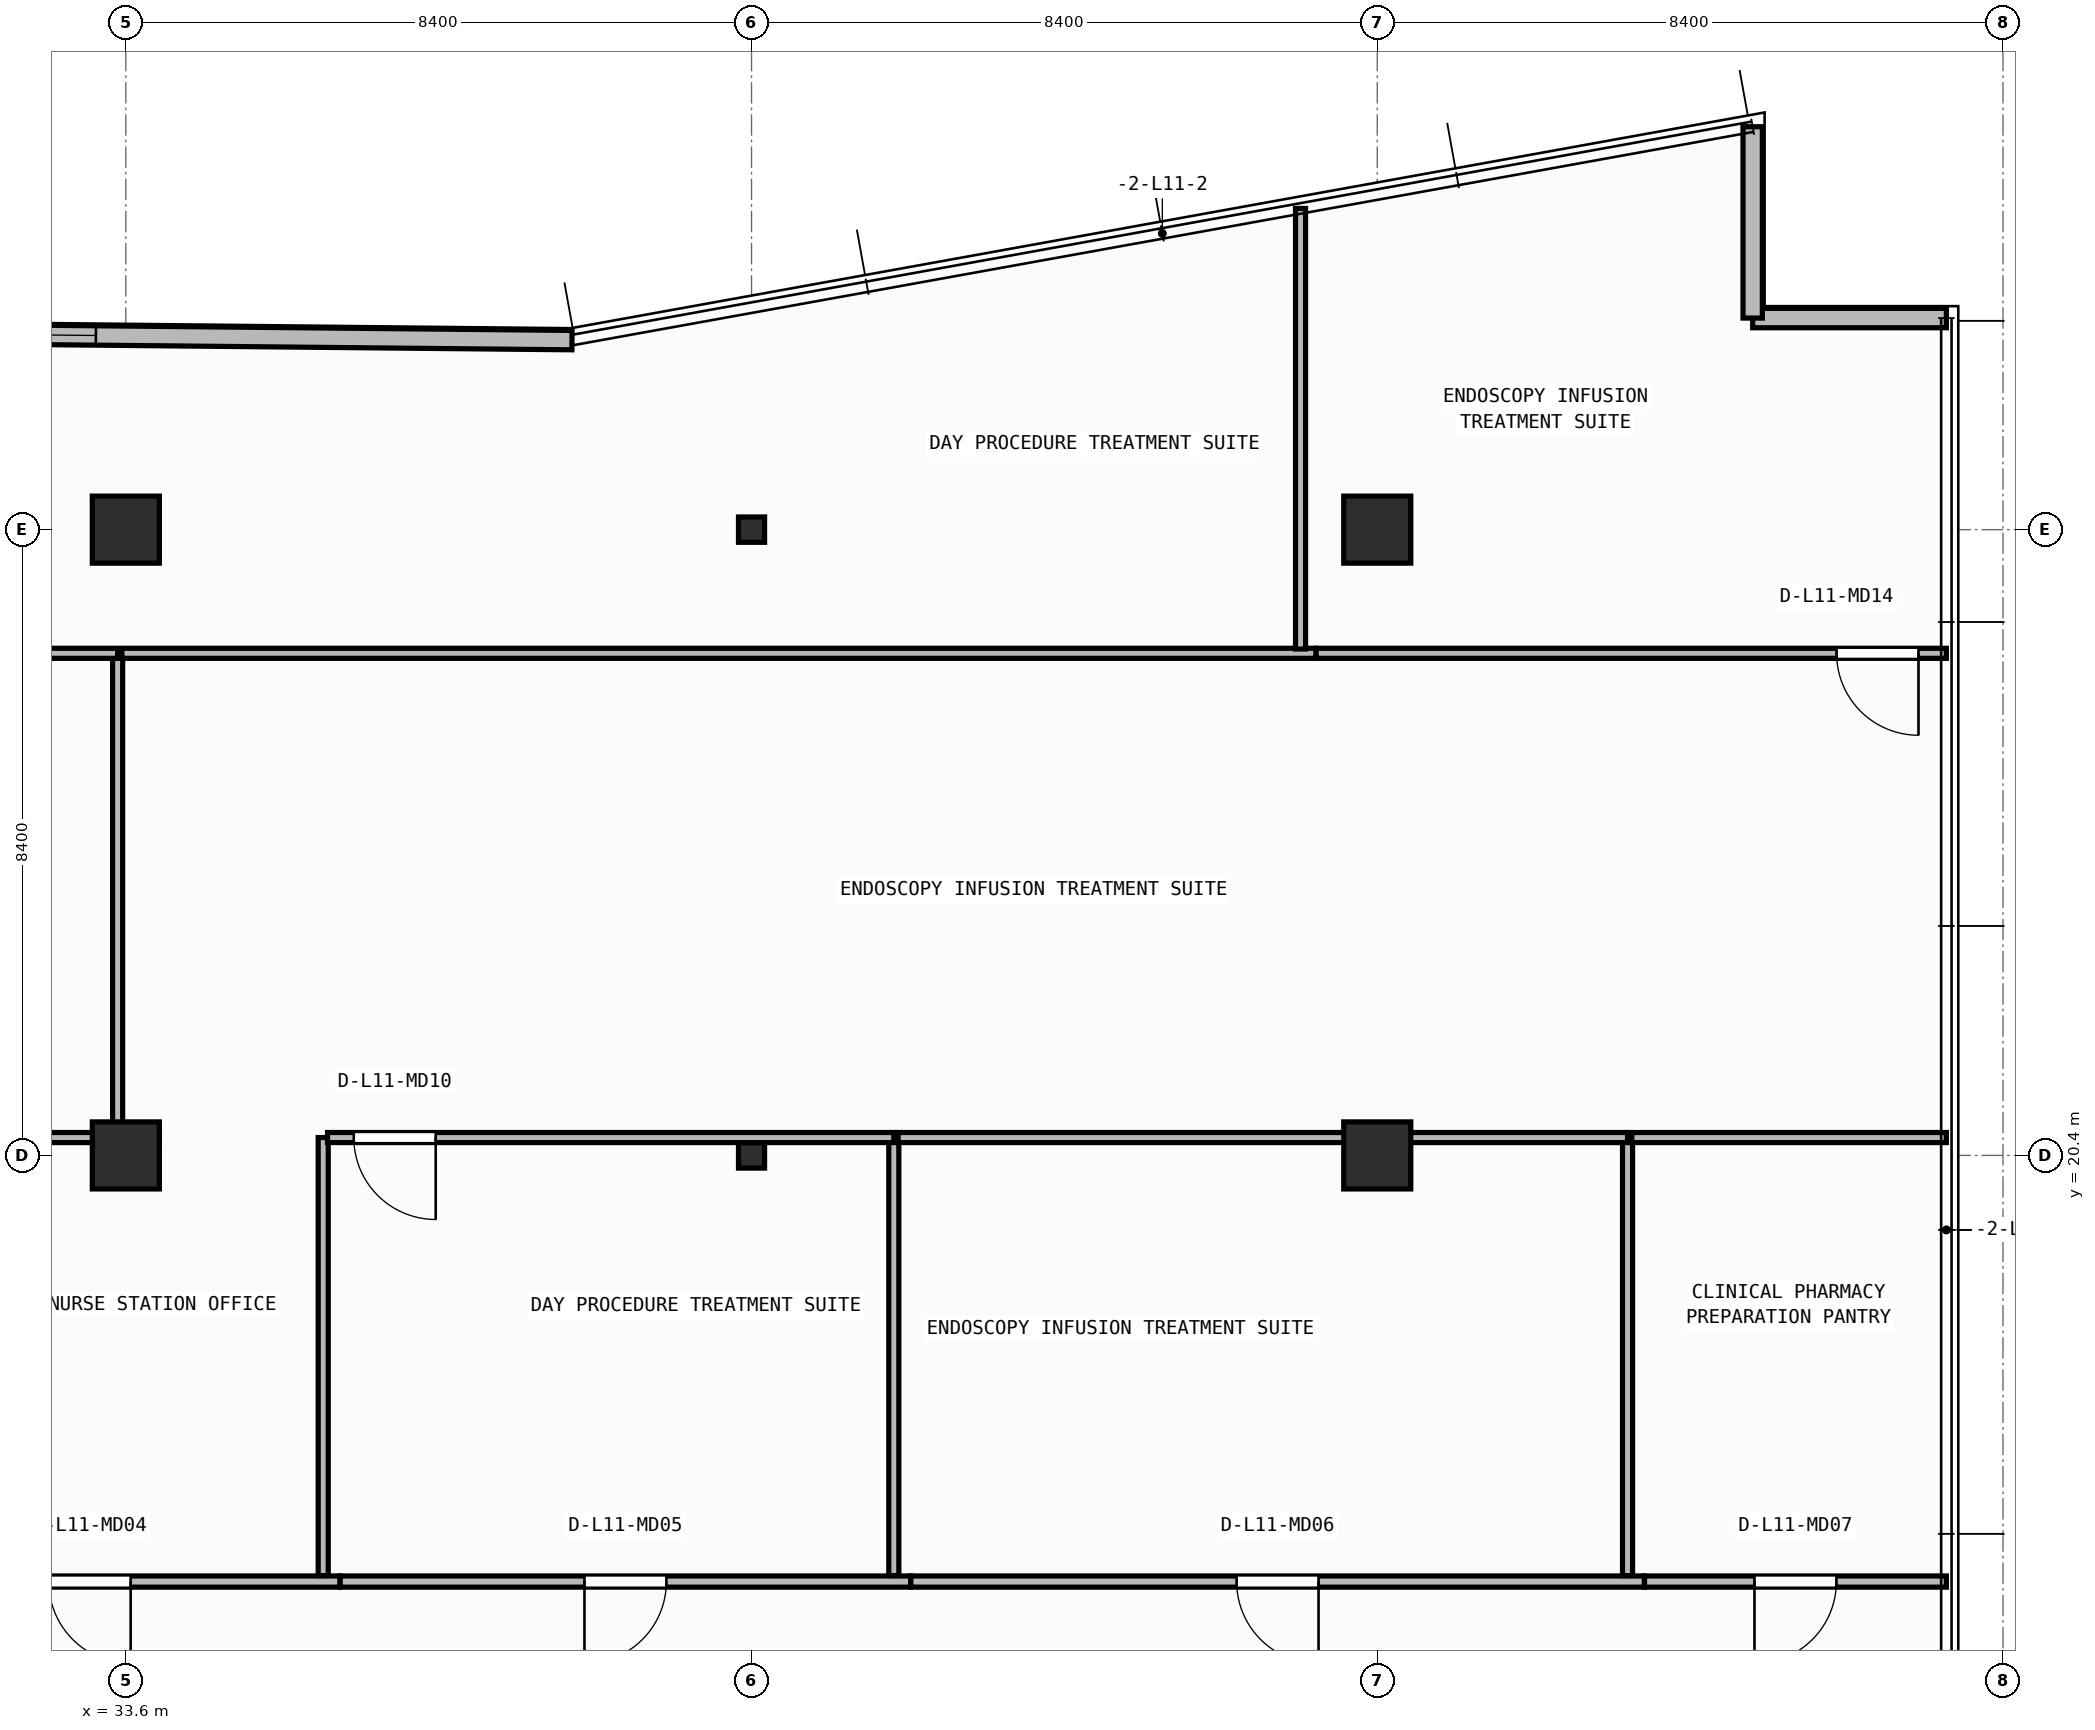
"""IFC4 building model, lengths in metres.
Left out: names, types, materials, properties, quantities, classifications, styles, units other than length and angle.
Written with IfcOpenShell. Run it as: python <this file> out.ifc"""

import sys

from ifc_helpers import new_model, si_unit, direction, frame, frame_2d, origin, origin_2d, place, context, subcontext, project, spatial, rectangle, i_section, extrude, element, fill, save


model = new_model("IFC4")
c1 = context("Model", 3, precision=1e-05, world=origin(), true_north=direction((0.0, 1.0)))
c2 = subcontext(c1, "Body", "Model", "MODEL_VIEW")
j1 = project(units=[si_unit("LENGTHUNIT", "METRE"), si_unit("PLANEANGLEUNIT", "RADIAN")], contexts=[c1])
p1 = place(None, origin())
s1 = spatial("IfcSite", under=j1, at=p1, CompositionType="ELEMENT")
p2 = place(p1, origin())
s2 = spatial("IfcBuilding", under=s1, at=p2, CompositionType="ELEMENT")
p3 = place(p2, frame((0.0, 0.0, 46.2)))
s3 = spatial("IfcBuildingStorey", under=s2, at=p3, CompositionType="ELEMENT", Elevation=46.2)
p4 = place(p3, frame((33.6, 20.4, 0.0), z_axis=(0.0, 0.0, 1.0), x_axis=(1.0, 0.0, 0.0)))
e1 = element("IfcColumn", 1, at=p4, inside=s3, PredefinedType="COLUMN", context=c2, shape_type="SweptSolid", body=[
    extrude(rectangle(XDim=0.9, YDim=0.9, at=origin_2d()), origin(), (0.0, 0.0, 1.0), 3.95),
])
p5 = place(p3, frame((42.0, 20.4, 0.0), z_axis=(0.0, 0.0, 1.0), x_axis=(1.0, 0.0, 0.0)))
e2 = element("IfcColumn", 2, at=p5, inside=s3, PredefinedType="COLUMN", context=c2, shape_type="SweptSolid", body=[
    extrude(i_section(OverallWidth=0.35, OverallDepth=0.34, WebThickness=0.016, FlangeThickness=0.028, at=origin_2d()), origin(), (0.0, 0.0, 1.0), 3.95),
])
for number, where, z_axis, x_axis in (
    (3, (50.4, 20.4, 0.0), (0.0, 0.0, 1.0), (1.0, 0.0, 0.0)),
    (4, (33.6, 28.8, 0.0), (0.0, 0.0, 1.0), (1.0, 0.0, 0.0)),
):
    element("IfcColumn", number, at=place(p3, frame(where, z_axis=z_axis, x_axis=x_axis)), inside=s3, PredefinedType="COLUMN", context=c2, shape_type="SweptSolid", body=[
        extrude(rectangle(XDim=0.9, YDim=0.9, at=origin_2d()), origin(), (0.0, 0.0, 1.0), 3.95),
    ])
p6 = place(p3, frame((42.0, 28.8, 0.0), z_axis=(0.0, 0.0, 1.0), x_axis=(1.0, 0.0, 0.0)))
e5 = element("IfcColumn", 5, at=p6, inside=s3, PredefinedType="COLUMN", context=c2, shape_type="SweptSolid", body=[
    extrude(i_section(OverallWidth=0.35, OverallDepth=0.34, WebThickness=0.016, FlangeThickness=0.028, at=origin_2d()), origin(), (0.0, 0.0, 1.0), 3.95),
])
p7 = place(p3, frame((50.4, 28.8, 0.0), z_axis=(0.0, 0.0, 1.0), x_axis=(1.0, 0.0, 0.0)))
e6 = element("IfcColumn", 6, at=p7, inside=s3, PredefinedType="COLUMN", context=c2, shape_type="SweptSolid", body=[
    extrude(rectangle(XDim=0.9, YDim=0.9, at=origin_2d()), origin(), (0.0, 0.0, 1.0), 3.95),
])
p8 = place(p3, frame((58.04, 31.64, 0.0), z_axis=(0.0, 0.0, 1.0), x_axis=(-1.0, 0.0, 0.0)))
e7 = element("IfcWall", 7, at=p8, inside=s3, PredefinedType="STANDARD", context=c2, shape_type="SweptSolid", body=[
    extrude(rectangle(XDim=2.6, YDim=0.26, at=frame_2d((1.3, 0.0))), origin(), (0.0, 0.0, 1.0), 3.71),
])
p9 = place(p3, frame((55.44, 31.64, 0.0), z_axis=(0.0, 0.0, 1.0), x_axis=(0.0, 1.0, 0.0)))
e8 = element("IfcWall", 8, at=p9, inside=s3, PredefinedType="STANDARD", context=c2, shape_type="SweptSolid", body=[
    extrude(rectangle(XDim=2.569, YDim=0.26, at=frame_2d((1.284, 0.0))), origin(), (0.0, 0.0, 1.0), 3.71),
])
p10 = place(p3, frame((39.59, 31.344, 0.0), z_axis=(0.0, 0.0, 1.0), x_axis=(-0.999952362926, 0.009760731435, 0.0)))
e9 = element("IfcWall", 9, at=p10, inside=s3, PredefinedType="STANDARD", context=c2, shape_type="SweptSolid", body=[
    extrude(rectangle(XDim=15.183, YDim=0.26, at=frame_2d((7.591, 0.0))), origin(), (0.0, 0.0, 1.0), 3.71),
])
p11 = place(p10, frame((6.391, 0.0, 0.9)))
e10 = element("IfcOpeningElement", 10, at=p11, cuts=e9, PredefinedType="OPENING", context=c2, shape_type="SweptSolid", body=[
    extrude(rectangle(XDim=2.4, YDim=1.65, at=frame_2d((1.2, 0.825))), frame((0.0, 0.14, 0.0), z_axis=(0.0, -1.0, 0.0), x_axis=(1.0, 0.0, 0.0)), (0.0, 0.0, 1.0), 0.28),
])
p12 = place(p3, frame((36.476, 14.68, 0.0), z_axis=(0.0, 0.0, 1.0), x_axis=(-1.0, 0.0, 0.0)))
e11 = element("IfcWall", 11, at=p12, inside=s3, PredefinedType="PARTITIONING", context=c2, shape_type="SweptSolid", body=[
    extrude(rectangle(XDim=6.722, YDim=0.15, at=frame_2d((3.361, 0.0))), origin(), (0.0, 0.0, 1.0), 3.71),
])
p13 = place(p12, frame((2.811, 0.0, 0.0)))
e12 = element("IfcOpeningElement", 12, at=p13, cuts=e11, PredefinedType="OPENING", context=c2, shape_type="SweptSolid", body=[
    extrude(rectangle(XDim=1.1, YDim=2.1, at=frame_2d((0.55, 1.05))), frame((0.0, 0.085, 0.0), z_axis=(0.0, -1.0, 0.0), x_axis=(1.0, 0.0, 0.0)), (0.0, 0.0, 1.0), 0.17),
])
p14 = place(p3, frame((44.136, 14.68, 0.0), z_axis=(0.0, 0.0, 1.0), x_axis=(-1.0, 0.0, 0.0)))
e13 = element("IfcWall", 13, at=p14, inside=s3, PredefinedType="PARTITIONING", context=c2, shape_type="SweptSolid", body=[
    extrude(rectangle(XDim=7.658, YDim=0.15, at=frame_2d((3.829, 0.0))), origin(), (0.0, 0.0, 1.0), 3.71),
])
p15 = place(p14, frame((3.279, 0.0, 0.0)))
e14 = element("IfcOpeningElement", 14, at=p15, cuts=e13, PredefinedType="OPENING", context=c2, shape_type="SweptSolid", body=[
    extrude(rectangle(XDim=1.1, YDim=2.1, at=frame_2d((0.55, 1.05))), frame((0.0, 0.085, 0.0), z_axis=(0.0, -1.0, 0.0), x_axis=(1.0, 0.0, 0.0)), (0.0, 0.0, 1.0), 0.17),
])
p16 = place(p3, frame((53.986, 14.68, 0.0), z_axis=(0.0, 0.0, 1.0), x_axis=(-1.0, 0.0, 0.0)))
e15 = element("IfcWall", 15, at=p16, inside=s3, PredefinedType="PARTITIONING", context=c2, shape_type="SweptSolid", body=[
    extrude(rectangle(XDim=9.848, YDim=0.15, at=frame_2d((4.924, 0.0))), origin(), (0.0, 0.0, 1.0), 3.71),
])
p17 = place(p16, frame((4.374, 0.0, 0.0)))
e16 = element("IfcOpeningElement", 16, at=p17, cuts=e15, PredefinedType="OPENING", context=c2, shape_type="SweptSolid", body=[
    extrude(rectangle(XDim=1.1, YDim=2.1, at=frame_2d((0.55, 1.05))), frame((0.0, 0.085, 0.0), z_axis=(0.0, -1.0, 0.0), x_axis=(1.0, 0.0, 0.0)), (0.0, 0.0, 1.0), 0.17),
])
p18 = place(p3, frame((58.04, 14.68, 0.0), z_axis=(0.0, 0.0, 1.0), x_axis=(-1.0, 0.0, 0.0)))
e17 = element("IfcWall", 17, at=p18, inside=s3, PredefinedType="PARTITIONING", context=c2, shape_type="SweptSolid", body=[
    extrude(rectangle(XDim=4.052, YDim=0.15, at=frame_2d((2.026, 0.0))), origin(), (0.0, 0.0, 1.0), 3.71),
])
p19 = place(p18, frame((1.476, 0.0, 0.0)))
e18 = element("IfcOpeningElement", 18, at=p19, cuts=e17, PredefinedType="OPENING", context=c2, shape_type="SweptSolid", body=[
    extrude(rectangle(XDim=1.1, YDim=2.1, at=frame_2d((0.55, 1.05))), frame((0.0, 0.085, 0.0), z_axis=(0.0, -1.0, 0.0), x_axis=(1.0, 0.0, 0.0)), (0.0, 0.0, 1.0), 0.17),
])
p20 = place(p3, frame((36.25, 14.76, 0.0), z_axis=(0.0, 0.0, 1.0), x_axis=(0.0, 1.0, 0.0)))
e19 = element("IfcWall", 19, at=p20, inside=s3, PredefinedType="PARTITIONING", context=c2, shape_type="SweptSolid", body=[
    extrude(rectangle(XDim=5.88, YDim=0.135, at=frame_2d((2.94, 0.0))), origin(), (0.0, 0.0, 1.0), 3.71),
])
p21 = place(p3, frame((34.05, 20.64, 0.0), z_axis=(0.0, 0.0, 1.0), x_axis=(-1.0, 0.0, 0.0)))
e20 = element("IfcWall", 20, at=p21, inside=s3, PredefinedType="PARTITIONING", context=c2, shape_type="SweptSolid", body=[
    extrude(rectangle(XDim=4.085, YDim=0.135, at=frame_2d((2.042, 0.0))), origin(), (0.0, 0.0, 1.0), 3.073),
])
p22 = place(p3, frame((43.91, 14.76, 0.0), z_axis=(0.0, 0.0, 1.0), x_axis=(0.0, 1.0, 0.0)))
e21 = element("IfcWall", 21, at=p22, inside=s3, PredefinedType="PARTITIONING", context=c2, shape_type="SweptSolid", body=[
    extrude(rectangle(XDim=5.88, YDim=0.135, at=frame_2d((2.94, 0.0))), origin(), (0.0, 0.0, 1.0), 3.71),
])
p23 = place(p3, frame((43.91, 20.64, 0.0), z_axis=(0.0, 0.0, 1.0), x_axis=(-1.0, 0.0, 0.0)))
e22 = element("IfcWall", 22, at=p23, inside=s3, PredefinedType="PARTITIONING", context=c2, shape_type="SweptSolid", body=[
    extrude(rectangle(XDim=7.602, YDim=0.135, at=frame_2d((3.801, 0.0))), origin(), (0.0, 0.0, 1.0), 3.073),
])
p24 = place(p23, frame((6.15, 0.0, 0.0)))
e23 = element("IfcOpeningElement", 23, at=p24, cuts=e22, PredefinedType="OPENING", context=c2, shape_type="SweptSolid", body=[
    extrude(rectangle(XDim=1.1, YDim=2.1, at=frame_2d((0.55, 1.05))), frame((0.0, 0.077, 0.0), z_axis=(0.0, -1.0, 0.0), x_axis=(1.0, 0.0, 0.0)), (0.0, 0.0, 1.0), 0.155),
])
p25 = place(p3, frame((53.76, 14.76, 0.0), z_axis=(0.0, 0.0, 1.0), x_axis=(0.0, 1.0, 0.0)))
e24 = element("IfcWall", 24, at=p25, inside=s3, PredefinedType="PARTITIONING", context=c2, shape_type="SweptSolid", body=[
    extrude(rectangle(XDim=5.88, YDim=0.135, at=frame_2d((2.94, 0.0))), origin(), (0.0, 0.0, 1.0), 3.71),
])
p26 = place(p3, frame((53.76, 20.64, 0.0), z_axis=(0.0, 0.0, 1.0), x_axis=(-1.0, 0.0, 0.0)))
e25 = element("IfcWall", 25, at=p26, inside=s3, PredefinedType="PARTITIONING", context=c2, shape_type="SweptSolid", body=[
    extrude(rectangle(XDim=9.792, YDim=0.135, at=frame_2d((4.896, 0.0))), origin(), (0.0, 0.0, 1.0), 3.073),
])
p27 = place(p3, frame((58.04, 20.64, 0.0), z_axis=(0.0, 0.0, 1.0), x_axis=(-1.0, 0.0, 0.0)))
e26 = element("IfcWall", 26, at=p27, inside=s3, PredefinedType="PARTITIONING", context=c2, shape_type="SweptSolid", body=[
    extrude(rectangle(XDim=4.223, YDim=0.135, at=frame_2d((2.111, 0.0))), origin(), (0.0, 0.0, 1.0), 3.71),
])
p28 = place(p3, frame((33.49, 20.698, 0.0), z_axis=(0.0, 0.0, 1.0), x_axis=(0.0, 1.0, 0.0)))
e27 = element("IfcWall", 27, at=p28, inside=s3, PredefinedType="PARTITIONING", context=c2, shape_type="SweptSolid", body=[
    extrude(rectangle(XDim=6.442, YDim=0.135, at=frame_2d((3.221, 0.0))), origin(), (0.0, 0.0, 1.0), 3.073),
])
p29 = place(p3, frame((33.49, 27.14, 0.0), z_axis=(0.0, 0.0, 1.0), x_axis=(-1.0, 0.0, 0.0)))
e28 = element("IfcWall", 28, at=p29, inside=s3, PredefinedType="PARTITIONING", context=c2, shape_type="SweptSolid", body=[
    extrude(rectangle(XDim=4.24, YDim=0.135, at=frame_2d((2.12, 0.0))), origin(), (0.0, 0.0, 1.0), 3.71),
])
p30 = place(p29, frame((2.872, 0.0, 0.0)))
e29 = element("IfcOpeningElement", 29, at=p30, cuts=e28, PredefinedType="OPENING", context=c2, shape_type="SweptSolid", body=[
    extrude(rectangle(XDim=1.1, YDim=2.1, at=frame_2d((0.55, 1.05))), frame((0.0, 0.077, 0.0), z_axis=(0.0, -1.0, 0.0), x_axis=(1.0, 0.0, 0.0)), (0.0, 0.0, 1.0), 0.155),
])
p31 = place(p3, frame((49.577, 27.14, 0.0), z_axis=(0.0, 0.0, 1.0), x_axis=(-1.0, 0.0, 0.0)))
e30 = element("IfcWall", 30, at=p31, inside=s3, PredefinedType="PARTITIONING", context=c2, shape_type="SweptSolid", body=[
    extrude(rectangle(XDim=16.03, YDim=0.135, at=frame_2d((8.015, 0.0))), origin(), (0.0, 0.0, 1.0), 3.71),
])
p32 = place(p3, frame((58.04, 27.14, 0.0), z_axis=(0.0, 0.0, 1.0), x_axis=(-1.0, 0.0, 0.0)))
e31 = element("IfcWall", 31, at=p32, inside=s3, PredefinedType="PARTITIONING", context=c2, shape_type="SweptSolid", body=[
    extrude(rectangle(XDim=8.46, YDim=0.135, at=frame_2d((4.23, 0.0))), origin(), (0.0, 0.0, 1.0), 3.71),
])
p33 = place(p32, frame((0.374, 0.0, 0.0)))
e32 = element("IfcOpeningElement", 32, at=p33, cuts=e31, PredefinedType="OPENING", context=c2, shape_type="SweptSolid", body=[
    extrude(rectangle(XDim=1.1, YDim=2.1, at=frame_2d((0.55, 1.05))), frame((0.0, 0.077, 0.0), z_axis=(0.0, -1.0, 0.0), x_axis=(1.0, 0.0, 0.0)), (0.0, 0.0, 1.0), 0.155),
])
p34 = place(p3, frame((49.37, 27.198, 0.0), z_axis=(0.0, 0.0, 1.0), x_axis=(0.0, 1.0, 0.0)))
e33 = element("IfcWall", 33, at=p34, inside=s3, PredefinedType="PARTITIONING", context=c2, shape_type="SweptSolid", body=[
    extrude(rectangle(XDim=5.914, YDim=0.135, at=frame_2d((2.957, 0.0))), origin(), (0.0, 0.0, 1.0), 3.71),
])
p35 = place(p11, origin())
e34 = element("IfcWindow", 34, at=p35, inside=s3, PartitioningType="SINGLE_PANEL", PredefinedType="WINDOW", context=c2, shape_type="SweptSolid", body=[
    extrude(rectangle(XDim=2.4, YDim=1.65, at=frame_2d((1.2, 0.825))), frame((0.0, 0.03, 0.0), z_axis=(0.0, -1.0, 0.0), x_axis=(1.0, 0.0, 0.0)), (0.0, 0.0, 1.0), 0.06),
])
fill(e10, e34)
p36 = place(p13, origin())
e35 = element("IfcDoor", 35, at=p36, inside=s3, OperationType="SINGLE_SWING_LEFT", PredefinedType="DOOR", context=c2, shape_type="SweptSolid", body=[
    extrude(rectangle(XDim=1.1, YDim=2.1, at=frame_2d((0.55, 1.05))), frame((0.0, 0.025, 0.0), z_axis=(0.0, -1.0, 0.0), x_axis=(1.0, 0.0, 0.0)), (0.0, 0.0, 1.0), 0.05),
])
fill(e12, e35)
p37 = place(p15, origin())
e36 = element("IfcDoor", 36, at=p37, inside=s3, OperationType="SINGLE_SWING_RIGHT", PredefinedType="DOOR", context=c2, shape_type="SweptSolid", body=[
    extrude(rectangle(XDim=1.1, YDim=2.1, at=frame_2d((0.55, 1.05))), frame((0.0, 0.025, 0.0), z_axis=(0.0, -1.0, 0.0), x_axis=(1.0, 0.0, 0.0)), (0.0, 0.0, 1.0), 0.05),
])
fill(e14, e36)
p38 = place(p17, origin())
e37 = element("IfcDoor", 37, at=p38, inside=s3, OperationType="SINGLE_SWING_LEFT", PredefinedType="DOOR", context=c2, shape_type="SweptSolid", body=[
    extrude(rectangle(XDim=1.1, YDim=2.1, at=frame_2d((0.55, 1.05))), frame((0.0, 0.025, 0.0), z_axis=(0.0, -1.0, 0.0), x_axis=(1.0, 0.0, 0.0)), (0.0, 0.0, 1.0), 0.05),
])
fill(e16, e37)
p39 = place(p19, origin())
e38 = element("IfcDoor", 38, at=p39, inside=s3, OperationType="SINGLE_SWING_RIGHT", PredefinedType="DOOR", context=c2, shape_type="SweptSolid", body=[
    extrude(rectangle(XDim=1.1, YDim=2.1, at=frame_2d((0.55, 1.05))), frame((0.0, 0.025, 0.0), z_axis=(0.0, -1.0, 0.0), x_axis=(1.0, 0.0, 0.0)), (0.0, 0.0, 1.0), 0.05),
])
fill(e18, e38)
p40 = place(p24, origin())
e39 = element("IfcDoor", 39, at=p40, inside=s3, OperationType="SINGLE_SWING_LEFT", PredefinedType="DOOR", context=c2, shape_type="SweptSolid", body=[
    extrude(rectangle(XDim=1.1, YDim=2.1, at=frame_2d((0.55, 1.05))), frame((0.0, 0.025, 0.0), z_axis=(0.0, -1.0, 0.0), x_axis=(1.0, 0.0, 0.0)), (0.0, 0.0, 1.0), 0.05),
])
fill(e23, e39)
p41 = place(p33, origin())
e40 = element("IfcDoor", 40, at=p41, inside=s3, OperationType="SINGLE_SWING_LEFT", PredefinedType="DOOR", context=c2, shape_type="SweptSolid", body=[
    extrude(rectangle(XDim=1.1, YDim=2.1, at=frame_2d((0.55, 1.05))), frame((0.0, 0.025, 0.0), z_axis=(0.0, -1.0, 0.0), x_axis=(1.0, 0.0, 0.0)), (0.0, 0.0, 1.0), 0.05),
])
fill(e32, e40)
save(model, sys.argv[1])
